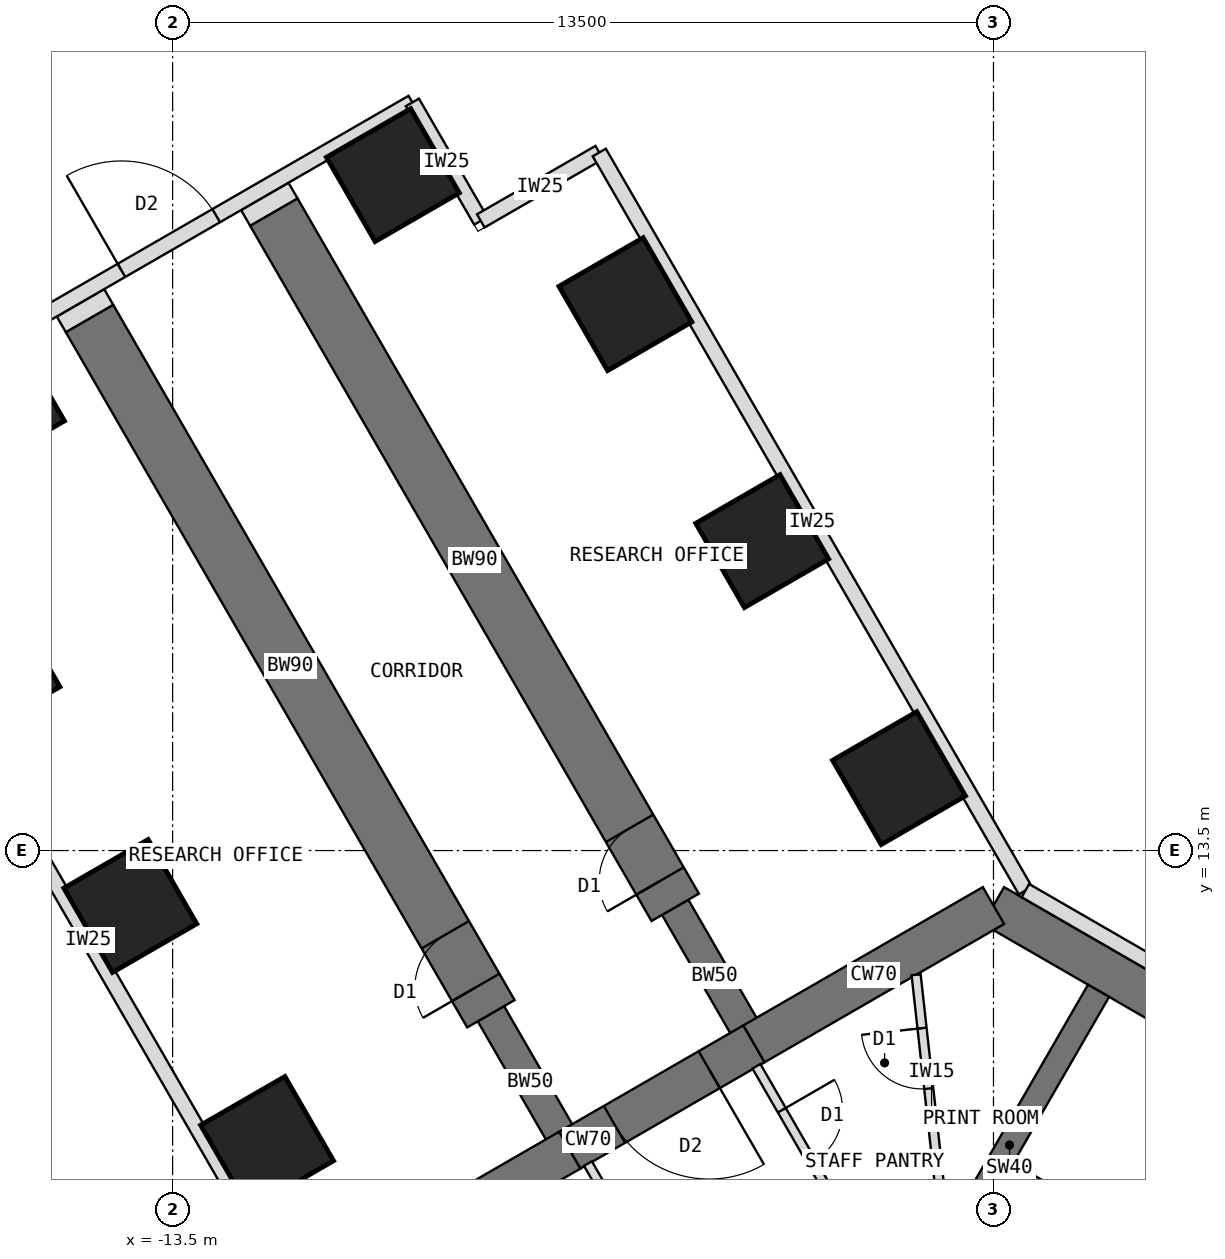
"""IFC4 building model, lengths in metres.
Left out: names, types, materials, properties, quantities, classifications, styles, units other than length and angle.
Written with IfcOpenShell. Run it as: python <this file> out.ifc"""

import sys

from ifc_helpers import new_model, si_unit, direction, frame, frame_2d, origin, origin_2d, place, context, subcontext, project, spatial, rectangle, extrude, element, fill, save


model = new_model("IFC4")
c1 = context("Model", 3, precision=1e-05, world=origin(), true_north=direction((0.0, 1.0)))
c2 = subcontext(c1, "Body", "Model", "MODEL_VIEW")
j1 = project(units=[si_unit("LENGTHUNIT", "METRE"), si_unit("PLANEANGLEUNIT", "RADIAN")], contexts=[c1])
p1 = place(None, origin())
s1 = spatial("IfcSite", under=j1, at=p1, CompositionType="ELEMENT")
p2 = place(p1, origin())
s2 = spatial("IfcBuilding", under=s1, at=p2, CompositionType="ELEMENT")
p3 = place(p2, frame((0.0, 0.0, 15.5)))
s3 = spatial("IfcBuildingStorey", under=s2, at=p3, CompositionType="ELEMENT", Elevation=15.5)
for number, where, z_axis, x_axis in (
    (1, (-13.5, 27.0, 0.0), (0.0, 0.0, 1.0), (1.0, 0.0, 0.0)),
    (2, (0.0, 27.0, 0.0), (0.0, 0.0, 1.0), (1.0, 0.0, 0.0)),
):
    element("IfcColumn", number, at=place(p3, frame(where, z_axis=z_axis, x_axis=x_axis)), inside=s3, PredefinedType="COLUMN", context=c2, shape_type="SweptSolid", body=[
        extrude(rectangle(XDim=1.5, YDim=1.5, at=origin_2d()), origin(), (0.0, 0.0, 1.0), 5.0),
    ])
p4 = place(p3, frame((10.908, 6.298, 0.0), z_axis=(0.0, 0.0, 1.0), x_axis=(-0.866021940709, 0.500005998175, 0.0)))
e3 = element("IfcWall", 3, at=p4, inside=s3, PredefinedType="SHEAR", context=c2, shape_type="SweptSolid", body=[
    extrude(rectangle(XDim=12.596, YDim=0.7, at=frame_2d((6.298, 0.0))), origin(), (0.0, 0.0, 1.0), 5.0),
])
p5 = place(p3, frame((0.0, 12.596, 0.0), z_axis=(0.0, 0.0, 1.0), x_axis=(-0.866011268655, -0.500024481964, 0.0)))
e4 = element("IfcWall", 4, at=p5, inside=s3, PredefinedType="SHEAR", context=c2, shape_type="SweptSolid", body=[
    extrude(rectangle(XDim=4.548, YDim=0.7, at=frame_2d((2.274, 0.0))), origin(), (0.0, 0.0, 1.0), 5.0),
])
p6 = place(p3, frame((-3.939, 10.322, 0.0), z_axis=(0.0, 0.0, 1.0), x_axis=(-0.866019471182, -0.500010275428, 0.0)))
e5 = element("IfcWall", 5, at=p6, inside=s3, PredefinedType="SHEAR", context=c2, shape_type="SweptSolid", body=[
    extrude(rectangle(XDim=3.5, YDim=0.7, at=frame_2d((1.75, 0.0))), origin(), (0.0, 0.0, 1.0), 5.0),
])
p7 = place(p6, frame((0.85, 0.0, 0.0)))
e6 = element("IfcOpeningElement", 6, at=p7, cuts=e5, PredefinedType="OPENING", context=c2, shape_type="SweptSolid", body=[
    extrude(rectangle(XDim=1.8, YDim=2.1, at=frame_2d((0.9, 1.05))), frame((0.0, 0.36, 0.0), z_axis=(0.0, -1.0, 0.0), x_axis=(1.0, 0.0, 0.0)), (0.0, 0.0, 1.0), 0.72),
])
p8 = place(p3, frame((-6.97, 8.572, 0.0), z_axis=(0.0, 0.0, 1.0), x_axis=(-0.866034513004, -0.499984222037, 0.0)))
e7 = element("IfcWall", 7, at=p8, inside=s3, PredefinedType="SHEAR", context=c2, shape_type="SweptSolid", body=[
    extrude(rectangle(XDim=4.548, YDim=0.7, at=frame_2d((2.274, 0.0))), origin(), (0.0, 0.0, 1.0), 5.0),
])
p9 = place(p3, frame((-6.97, 8.572, 0.0), z_axis=(0.0, 0.0, 1.0), x_axis=(-0.499988811324, 0.866031863473, 0.0)))
e8 = element("IfcWall", 8, at=p9, inside=s3, PredefinedType="SHEAR", context=c2, shape_type="SweptSolid", body=[
    extrude(rectangle(XDim=2.592, YDim=0.5, at=frame_2d((1.296, 0.0))), origin(), (0.0, 0.0, 1.0), 5.0),
])
p10 = place(p3, frame((-8.266, 10.816, 0.0), z_axis=(0.0, 0.0, 1.0), x_axis=(-0.499996231654, 0.866027579429, 0.0)))
e9 = element("IfcWall", 9, at=p10, inside=s3, PredefinedType="SHEAR", context=c2, shape_type="SweptSolid", body=[
    extrude(rectangle(XDim=13.2, YDim=0.9, at=frame_2d((6.6, 0.0))), origin(), (0.0, 0.0, 1.0), 5.0),
])
p11 = place(p10, frame((0.5, 0.0, 0.0)))
e10 = element("IfcOpeningElement", 10, at=p11, cuts=e9, PredefinedType="OPENING", context=c2, shape_type="SweptSolid", body=[
    extrude(rectangle(XDim=1.0, YDim=2.1, at=frame_2d((0.5, 1.05))), frame((0.0, 0.46, 0.0), z_axis=(0.0, -1.0, 0.0), x_axis=(1.0, 0.0, 0.0)), (0.0, 0.0, 1.0), 0.92),
])
p12 = place(p3, frame((-3.939, 10.322, 0.0), z_axis=(0.0, 0.0, 1.0), x_axis=(-0.499918158782, 0.866072649678, 0.0)))
e11 = element("IfcWall", 11, at=p12, inside=s3, PredefinedType="SHEAR", context=c2, shape_type="SweptSolid", body=[
    extrude(rectangle(XDim=2.592, YDim=0.5, at=frame_2d((1.296, 0.0))), origin(), (0.0, 0.0, 1.0), 5.0),
])
p13 = place(p3, frame((-5.234, 12.566, 0.0), z_axis=(0.0, 0.0, 1.0), x_axis=(-0.500010103361, 0.866019570528, 0.0)))
e12 = element("IfcWall", 12, at=p13, inside=s3, PredefinedType="SHEAR", context=c2, shape_type="SweptSolid", body=[
    extrude(rectangle(XDim=13.2, YDim=0.9, at=frame_2d((6.6, 0.0))), origin(), (0.0, 0.0, 1.0), 5.0),
])
p14 = place(p13, frame((0.5, 0.0, 0.0)))
e13 = element("IfcOpeningElement", 13, at=p14, cuts=e12, PredefinedType="OPENING", context=c2, shape_type="SweptSolid", body=[
    extrude(rectangle(XDim=1.0, YDim=2.1, at=frame_2d((0.5, 1.05))), frame((0.0, 0.46, 0.0), z_axis=(0.0, -1.0, 0.0), x_axis=(1.0, 0.0, 0.0)), (0.0, 0.0, 1.0), 0.92),
])
for number, where, z_axis, x_axis in (
    (14, (-11.946, 8.691, 0.0), (0.0, 0.0, 1.0), (0.866, 0.5, 0.0)),
    (15, (-1.554, 14.691, 0.0), (0.0, 0.0, 1.0), (0.866, 0.5, 0.0)),
    (16, (-14.196, 12.588, 0.0), (0.0, 0.0, 1.0), (0.866, 0.5, 0.0)),
    (17, (-3.804, 18.588, 0.0), (0.0, 0.0, 1.0), (0.866, 0.5, 0.0)),
    (18, (-16.446, 16.486, 0.0), (0.0, 0.0, 1.0), (0.866, 0.5, 0.0)),
    (19, (-6.054, 22.486, 0.0), (0.0, 0.0, 1.0), (0.866, 0.5, 0.0)),
    (20, (-16.373, 20.858, 0.0), (0.0, 0.0, 1.0), (0.866, 0.5, 0.0)),
    (21, (-9.877, 24.608, 0.0), (0.0, 0.0, 1.0), (0.866, 0.5, 0.0)),
):
    element("IfcColumn", number, at=place(p3, frame(where, z_axis=z_axis, x_axis=x_axis)), inside=s3, PredefinedType="COLUMN", context=c2, shape_type="SweptSolid", body=[
        extrude(rectangle(XDim=1.6, YDim=1.6, at=origin_2d()), origin(), (0.0, 0.0, 1.0), 5.0),
    ])
p15 = place(p3, frame((-14.865, 22.248, 0.0), z_axis=(0.0, 0.0, 1.0), x_axis=(-0.500426713919, 0.865778900179, 0.0)))
e22 = element("IfcWall", 22, at=p15, inside=s3, PredefinedType="PARTITIONING", context=c2, shape_type="SweptSolid", body=[
    extrude(rectangle(XDim=0.3, YDim=0.9, at=frame_2d((0.15, 0.0))), origin(), (0.0, 0.0, 1.0), 4.8),
])
p16 = place(p3, frame((-11.834, 23.998, 0.0), z_axis=(0.0, 0.0, 1.0), x_axis=(-0.499816412211, 0.866131372301, 0.0)))
e23 = element("IfcWall", 23, at=p16, inside=s3, PredefinedType="PARTITIONING", context=c2, shape_type="SweptSolid", body=[
    extrude(rectangle(XDim=0.3, YDim=0.9, at=frame_2d((0.15, 0.0))), origin(), (0.0, 0.0, 1.0), 4.8),
])
p17 = place(p3, frame((7.114, 4.322, 0.0), z_axis=(0.0, 0.0, 1.0), x_axis=(-0.866026010844, 0.49999894854, 0.0)))
e24 = element("IfcWall", 24, at=p17, inside=s3, PredefinedType="SHEAR", context=c2, shape_type="SweptSolid", body=[
    extrude(rectangle(XDim=8.0, YDim=0.2, at=frame_2d((4.0, 0.0))), origin(), (0.0, 0.0, 1.0), 5.0),
])
p18 = place(p17, frame((6.8, 0.0, 0.0)))
e25 = element("IfcOpeningElement", 25, at=p18, cuts=e24, PredefinedType="OPENING", context=c2, shape_type="SweptSolid", body=[
    extrude(rectangle(XDim=0.9, YDim=2.1, at=frame_2d((0.45, 1.05))), frame((0.0, 0.11, 0.0), z_axis=(0.0, -1.0, 0.0), x_axis=(1.0, 0.0, 0.0)), (0.0, 0.0, 1.0), 0.22),
])
p19 = place(p3, frame((-1.201, 6.12, 0.0), z_axis=(0.0, 0.0, 1.0), x_axis=(0.500002627198, 0.866023886965, 0.0)))
e26 = element("IfcWall", 26, at=p19, inside=s3, PredefinedType="SHEAR", context=c2, shape_type="SweptSolid", body=[
    extrude(rectangle(XDim=5.858, YDim=0.4, at=frame_2d((2.929, 0.0))), origin(), (0.0, 0.0, 1.0), 5.0),
])
p20 = place(p3, frame((-4.436, 4.483, 0.0), z_axis=(0.0, 0.0, 1.0), x_axis=(-0.500017246033, 0.866015446554, 0.0)))
e27 = element("IfcWall", 27, at=p20, inside=s3, PredefinedType="PARTITIONING", context=c2, shape_type="SweptSolid", body=[
    extrude(rectangle(XDim=4.469, YDim=0.15, at=frame_2d((2.234, 0.0))), origin(), (0.0, 0.0, 1.0), 4.8),
])
p21 = place(p20, frame((0.855, 0.0, 0.0)))
e28 = element("IfcOpeningElement", 28, at=p21, cuts=e27, PredefinedType="OPENING", context=c2, shape_type="SweptSolid", body=[
    extrude(rectangle(XDim=1.0, YDim=2.1, at=frame_2d((0.5, 1.05))), frame((0.0, 0.085, 0.0), z_axis=(0.0, -1.0, 0.0), x_axis=(1.0, 0.0, 0.0)), (0.0, 0.0, 1.0), 0.17),
])
p22 = place(p3, frame((-3.898, 9.952, 0.0), z_axis=(0.0, 0.0, 1.0), x_axis=(0.499999927604, -0.866025445582, 0.0)))
e29 = element("IfcWall", 29, at=p22, inside=s3, PredefinedType="PARTITIONING", context=c2, shape_type="SweptSolid", body=[
    extrude(rectangle(XDim=4.468, YDim=0.15, at=frame_2d((2.234, 0.0))), origin(), (0.0, 0.0, 1.0), 4.8),
])
p23 = place(p22, frame((0.834, 0.0, 0.0)))
e30 = element("IfcOpeningElement", 30, at=p23, cuts=e29, PredefinedType="OPENING", context=c2, shape_type="SweptSolid", body=[
    extrude(rectangle(XDim=1.0, YDim=2.1, at=frame_2d((0.5, 1.05))), frame((0.0, 0.085, 0.0), z_axis=(0.0, -1.0, 0.0), x_axis=(1.0, 0.0, 0.0)), (0.0, 0.0, 1.0), 0.17),
])
p24 = place(p3, frame((-0.764, 6.877, 0.0), z_axis=(0.0, 0.0, 1.0), x_axis=(-0.110408266965, 0.993886318744, 0.0)))
e31 = element("IfcWall", 31, at=p24, inside=s3, PredefinedType="PARTITIONING", context=c2, shape_type="SweptSolid", body=[
    extrude(rectangle(XDim=4.608, YDim=0.15, at=frame_2d((2.304, 0.0))), origin(), (0.0, 0.0, 1.0), 4.8),
])
p25 = place(p24, frame((2.726, 0.0, 0.0)))
e32 = element("IfcOpeningElement", 32, at=p25, cuts=e31, PredefinedType="OPENING", context=c2, shape_type="SweptSolid", body=[
    extrude(rectangle(XDim=1.0, YDim=2.1, at=frame_2d((0.5, 1.05))), frame((0.0, 0.085, 0.0), z_axis=(0.0, -1.0, 0.0), x_axis=(1.0, 0.0, 0.0)), (0.0, 0.0, 1.0), 0.17),
])
p26 = place(p3, frame((0.0, 14.1, 0.0), z_axis=(0.0, 0.0, 1.0), x_axis=(0.0, 1.0, 0.0)))
e33 = element("IfcWall", 33, at=p26, inside=s3, PredefinedType="PARTITIONING", context=c2, shape_type="SweptSolid", body=[
    extrude(rectangle(XDim=12.9, YDim=0.2, at=frame_2d((6.45, 0.0))), origin(), (0.0, 0.0, 1.0), 4.65),
])
p27 = place(p3, frame((0.346, 13.5, 0.0), z_axis=(0.0, 0.0, 1.0), x_axis=(1.0, 0.0, 0.0)))
e34 = element("IfcWall", 34, at=p27, inside=s3, PredefinedType="PARTITIONING", context=c2, shape_type="SweptSolid", body=[
    extrude(rectangle(XDim=13.154, YDim=0.2, at=frame_2d((6.577, 0.0))), origin(), (0.0, 0.0, 1.0), 4.65),
])
p28 = place(p3, frame((-11.383, 5.967, 0.0), z_axis=(0.0, 0.0, 1.0), x_axis=(-0.499996367808, 0.866027500821, 0.0)))
e35 = element("IfcWall", 35, at=p28, inside=s3, PredefinedType="STANDARD", context=c2, shape_type="SweptSolid", body=[
    extrude(rectangle(XDim=14.016, YDim=0.25, at=frame_2d((7.008, 0.0))), origin(), (0.0, 0.0, 1.0), 4.65),
])
p29 = place(p3, frame((-17.568, 21.178, 0.0), z_axis=(0.0, 0.0, 1.0), x_axis=(0.866025598446, 0.499999662836, 0.0)))
e36 = element("IfcWall", 36, at=p29, inside=s3, PredefinedType="STANDARD", context=c2, shape_type="SweptSolid", body=[
    extrude(rectangle(XDim=9.25, YDim=0.25, at=frame_2d((4.625, 0.0))), origin(), (0.0, 0.0, 1.0), 4.65),
])
p30 = place(p29, frame((3.725, 0.0, 0.0)))
e37 = element("IfcOpeningElement", 37, at=p30, cuts=e36, PredefinedType="OPENING", context=c2, shape_type="SweptSolid", body=[
    extrude(rectangle(XDim=1.8, YDim=2.1, at=frame_2d((0.9, 1.05))), frame((0.0, 0.135, 0.0), z_axis=(0.0, -1.0, 0.0), x_axis=(1.0, 0.0, 0.0)), (0.0, 0.0, 1.0), 0.27),
])
for number, where, z_axis, x_axis in (
    (38, (-9.557, 25.803, 0.0), (0.0, 0.0, 1.0), (0.5, -0.866, 0.0)),
    (39, (-8.432, 23.855, 0.0), (0.0, 0.0, 1.0), (0.866, 0.5, 0.0)),
):
    element("IfcWall", number, at=place(p3, frame(where, z_axis=z_axis, x_axis=x_axis)), inside=s3, PredefinedType="STANDARD", context=c2, shape_type="SweptSolid", body=[
        extrude(rectangle(XDim=2.25, YDim=0.25, at=frame_2d((1.125, 0.0))), origin(), (0.0, 0.0, 1.0), 4.65),
    ])
p31 = place(p3, frame((-6.484, 24.98, 0.0), z_axis=(0.0, 0.0, 1.0), x_axis=(0.499996367808, -0.866027500821, 0.0)))
e40 = element("IfcWall", 40, at=p31, inside=s3, PredefinedType="STANDARD", context=c2, shape_type="SweptSolid", body=[
    extrude(rectangle(XDim=14.016, YDim=0.25, at=frame_2d((7.008, 0.0))), origin(), (0.0, 0.0, 1.0), 4.65),
])
p32 = place(p3, frame((0.524, 12.842, 0.0), z_axis=(0.0, 0.0, 1.0), x_axis=(0.866027502425, -0.499996365031, 0.0)))
e41 = element("IfcWall", 41, at=p32, inside=s3, PredefinedType="STANDARD", context=c2, shape_type="SweptSolid", body=[
    extrude(rectangle(XDim=11.933, YDim=0.25, at=frame_2d((5.967, 0.0))), origin(), (0.0, 0.0, 1.0), 4.65),
])
p33 = place(p18, origin())
e42 = element("IfcDoor", 42, at=p33, inside=s3, OperationType="SINGLE_SWING_RIGHT", PredefinedType="DOOR", context=c2, shape_type="SweptSolid", body=[
    extrude(rectangle(XDim=0.9, YDim=2.1, at=frame_2d((0.45, 1.05))), frame((0.0, 0.025, 0.0), z_axis=(0.0, -1.0, 0.0), x_axis=(1.0, 0.0, 0.0)), (0.0, 0.0, 1.0), 0.05),
])
fill(e25, e42)
p34 = place(p7, origin())
e43 = element("IfcDoor", 43, at=p34, inside=s3, OperationType="DOUBLE_DOOR_DOUBLE_SWING", PredefinedType="DOOR", context=c2, shape_type="SweptSolid", body=[
    extrude(rectangle(XDim=1.72, YDim=2.06, at=frame_2d((0.9, 1.03))), frame((0.0, 0.025, 0.0), z_axis=(0.0, -1.0, 0.0), x_axis=(1.0, 0.0, 0.0)), (0.0, 0.0, 1.0), 0.05),
    extrude(rectangle(XDim=0.04, YDim=2.1, at=frame_2d((0.02, 1.05))), frame((0.0, 0.35, 0.0), z_axis=(0.0, -1.0, 0.0), x_axis=(1.0, 0.0, 0.0)), (0.0, 0.0, 1.0), 0.699),
    extrude(rectangle(XDim=0.04, YDim=2.1, at=frame_2d((1.78, 1.05))), frame((0.0, 0.35, 0.0), z_axis=(0.0, -1.0, 0.0), x_axis=(1.0, 0.0, 0.0)), (0.0, 0.0, 1.0), 0.699),
    extrude(rectangle(XDim=1.72, YDim=0.04, at=frame_2d((0.9, 2.08))), frame((0.0, 0.35, 0.0), z_axis=(0.0, -1.0, 0.0), x_axis=(1.0, 0.0, 0.0)), (0.0, 0.0, 1.0), 0.699),
])
fill(e6, e43)
p35 = place(p23, origin())
e44 = element("IfcDoor", 44, at=p35, inside=s3, OperationType="SINGLE_SWING_LEFT", PredefinedType="DOOR", context=c2, shape_type="SweptSolid", body=[
    extrude(rectangle(XDim=1.0, YDim=2.1, at=frame_2d((0.5, 1.05))), frame((0.0, 0.025, 0.0), z_axis=(0.0, -1.0, 0.0), x_axis=(1.0, 0.0, 0.0)), (0.0, 0.0, 1.0), 0.05),
])
fill(e30, e44)
p36 = place(p25, origin())
e45 = element("IfcDoor", 45, at=p36, inside=s3, OperationType="SINGLE_SWING_RIGHT", PredefinedType="DOOR", context=c2, shape_type="SweptSolid", body=[
    extrude(rectangle(XDim=1.0, YDim=2.1, at=frame_2d((0.5, 1.05))), frame((0.0, 0.025, 0.0), z_axis=(0.0, -1.0, 0.0), x_axis=(1.0, 0.0, 0.0)), (0.0, 0.0, 1.0), 0.05),
])
fill(e32, e45)
p37 = place(p11, origin())
e46 = element("IfcDoor", 46, at=p37, inside=s3, OperationType="SINGLE_SWING_LEFT", PredefinedType="DOOR", context=c2, shape_type="SweptSolid", body=[
    extrude(rectangle(XDim=0.92, YDim=2.06, at=frame_2d((0.5, 1.03))), frame((0.0, 0.025, 0.0), z_axis=(0.0, -1.0, 0.0), x_axis=(1.0, 0.0, 0.0)), (0.0, 0.0, 1.0), 0.05),
    extrude(rectangle(XDim=0.04, YDim=2.1, at=frame_2d((0.02, 1.05))), frame((0.0, 0.45, 0.0), z_axis=(0.0, -1.0, 0.0), x_axis=(1.0, 0.0, 0.0)), (0.0, 0.0, 1.0), 0.899),
    extrude(rectangle(XDim=0.04, YDim=2.1, at=frame_2d((0.98, 1.05))), frame((0.0, 0.45, 0.0), z_axis=(0.0, -1.0, 0.0), x_axis=(1.0, 0.0, 0.0)), (0.0, 0.0, 1.0), 0.899),
    extrude(rectangle(XDim=0.92, YDim=0.04, at=frame_2d((0.5, 2.08))), frame((0.0, 0.45, 0.0), z_axis=(0.0, -1.0, 0.0), x_axis=(1.0, 0.0, 0.0)), (0.0, 0.0, 1.0), 0.899),
])
fill(e10, e46)
p38 = place(p14, origin())
e47 = element("IfcDoor", 47, at=p38, inside=s3, OperationType="SINGLE_SWING_LEFT", PredefinedType="DOOR", context=c2, shape_type="SweptSolid", body=[
    extrude(rectangle(XDim=0.92, YDim=2.06, at=frame_2d((0.5, 1.03))), frame((0.0, 0.025, 0.0), z_axis=(0.0, -1.0, 0.0), x_axis=(1.0, 0.0, 0.0)), (0.0, 0.0, 1.0), 0.05),
    extrude(rectangle(XDim=0.04, YDim=2.1, at=frame_2d((0.02, 1.05))), frame((0.0, 0.45, 0.0), z_axis=(0.0, -1.0, 0.0), x_axis=(1.0, 0.0, 0.0)), (0.0, 0.0, 1.0), 0.899),
    extrude(rectangle(XDim=0.04, YDim=2.1, at=frame_2d((0.98, 1.05))), frame((0.0, 0.45, 0.0), z_axis=(0.0, -1.0, 0.0), x_axis=(1.0, 0.0, 0.0)), (0.0, 0.0, 1.0), 0.899),
    extrude(rectangle(XDim=0.92, YDim=0.04, at=frame_2d((0.5, 2.08))), frame((0.0, 0.45, 0.0), z_axis=(0.0, -1.0, 0.0), x_axis=(1.0, 0.0, 0.0)), (0.0, 0.0, 1.0), 0.899),
])
fill(e13, e47)
p39 = place(p30, origin())
e48 = element("IfcDoor", 48, at=p39, inside=s3, OperationType="DOUBLE_DOOR_DOUBLE_SWING", PredefinedType="DOOR", context=c2, shape_type="SweptSolid", body=[
    extrude(rectangle(XDim=1.8, YDim=2.1, at=frame_2d((0.9, 1.05))), frame((0.0, 0.025, 0.0), z_axis=(0.0, -1.0, 0.0), x_axis=(1.0, 0.0, 0.0)), (0.0, 0.0, 1.0), 0.05),
])
fill(e37, e48)
save(model, sys.argv[1])
